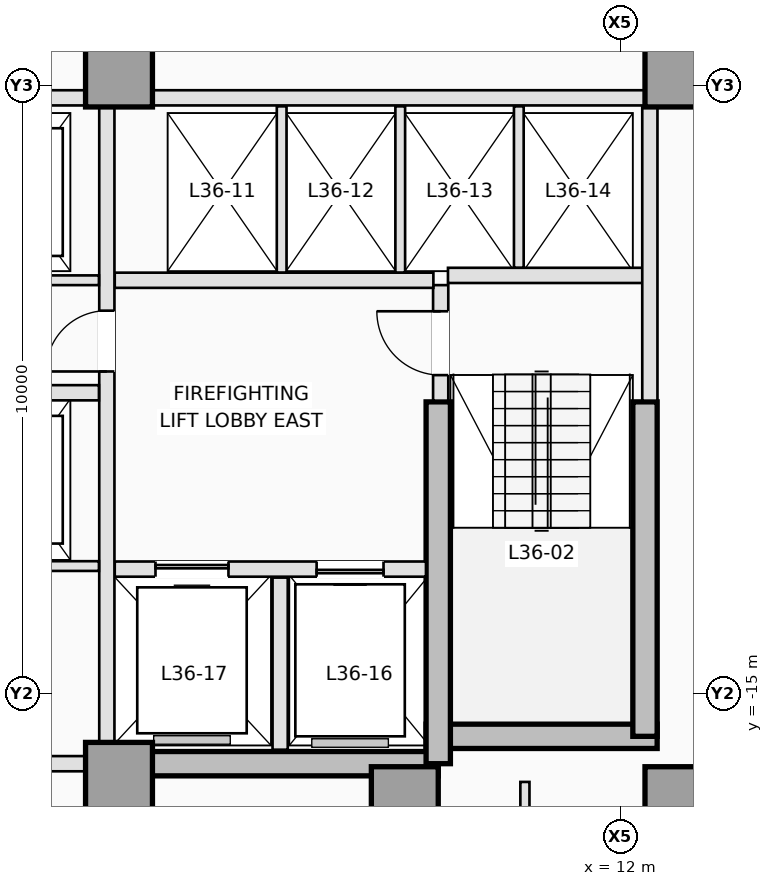
"""IFC4 building model, lengths in metres.
Left out: names, types, materials, properties, quantities, classifications, styles, units other than length and angle.
Written with IfcOpenShell. Run it as: python <this file> out.ifc"""

import sys

from ifc_helpers import new_model, si_unit, direction, frame, frame_2d, origin, origin_2d, place, context, subcontext, project, spatial, rectangle, extrude, element, fill, save


model = new_model("IFC4")
c1 = context("Model", 3, precision=1e-05, world=origin(), true_north=direction((0.0, 1.0)))
c2 = subcontext(c1, "Body", "Model", "MODEL_VIEW")
j1 = project(units=[si_unit("LENGTHUNIT", "METRE"), si_unit("PLANEANGLEUNIT", "RADIAN")], contexts=[c1])
p1 = place(None, origin())
s1 = spatial("IfcSite", under=j1, at=p1, CompositionType="ELEMENT")
p2 = place(p1, origin())
s2 = spatial("IfcBuilding", under=s1, at=p2, CompositionType="ELEMENT")
p3 = place(p2, frame((0.0, 0.0, 133.5)))
s3 = spatial("IfcBuildingStorey", under=s2, at=p3, CompositionType="ELEMENT", Elevation=133.5)
p4 = place(p3, frame((3.75, -16.15, 0.0), z_axis=(0.0, 0.0, 1.0), x_axis=(1.0, 0.0, 0.0)))
e1 = element("IfcWall", 1, at=p4, inside=s3, PredefinedType="SHEAR", context=c2, shape_type="SweptSolid", body=[
    extrude(rectangle(XDim=5.25, YDim=0.4, at=frame_2d((2.625, 0.0))), origin(), (0.0, 0.0, 1.0), 3.5),
])
p5 = place(p3, frame((8.8, -15.7, 0.0), z_axis=(0.0, 0.0, 1.0), x_axis=(1.0, 0.0, 0.0)))
e2 = element("IfcWall", 2, at=p5, inside=s3, PredefinedType="SHEAR", context=c2, shape_type="SweptSolid", body=[
    extrude(rectangle(XDim=3.8, YDim=0.4, at=frame_2d((1.9, 0.0))), origin(), (0.0, 0.0, 1.0), 3.5),
])
p6 = place(p3, frame((12.4, -15.7, 0.0), z_axis=(0.0, 0.0, 1.0), x_axis=(0.0, 1.0, 0.0)))
e3 = element("IfcWall", 3, at=p6, inside=s3, PredefinedType="SHEAR", context=c2, shape_type="SweptSolid", body=[
    extrude(rectangle(XDim=5.5, YDim=0.4, at=frame_2d((2.75, 0.0))), origin(), (0.0, 0.0, 1.0), 3.5),
])
p7 = place(p3, frame((9.0, -16.15, 0.0), z_axis=(0.0, 0.0, 1.0), x_axis=(0.0, 1.0, 0.0)))
e4 = element("IfcWall", 4, at=p7, inside=s3, PredefinedType="SHEAR", context=c2, shape_type="SweptSolid", body=[
    extrude(rectangle(XDim=5.95, YDim=0.4, at=frame_2d((2.975, 0.0))), origin(), (0.0, 0.0, 1.0), 3.5),
])
for number, where, z_axis, x_axis in (
    (5, (3.75, -16.35, 0.0), (0.0, 0.0, 1.0), (1.0, 0.0, 0.0)),
    (6, (8.45, -16.75, 0.0), (0.0, 0.0, 1.0), (1.0, 0.0, 0.0)),
    (7, (12.95, -16.75, 0.0), (0.0, 0.0, 1.0), (1.0, 0.0, 0.0)),
    (8, (3.75, -4.8, 0.0), (0.0, 0.0, 1.0), (1.0, 0.0, 0.0)),
    (9, (12.95, -4.8, 0.0), (0.0, 0.0, 1.0), (1.0, 0.0, 0.0)),
):
    element("IfcColumn", number, at=place(p3, frame(where, z_axis=z_axis, x_axis=x_axis)), inside=s3, PredefinedType="COLUMN", context=c2, shape_type="SweptSolid", body=[
        extrude(rectangle(XDim=1.1, YDim=1.1, at=origin_2d()), origin(), (0.0, 0.0, 1.0), 3.5),
    ])
p8 = place(p3, frame((9.04, -10.18, 0.0), z_axis=(0.0, 0.0, 1.0), x_axis=(0.0, 1.0, 0.0)))
e10 = element("IfcWall", 10, at=p8, inside=s3, PredefinedType="PARTITIONING", context=c2, shape_type="SweptSolid", body=[
    extrude(rectangle(XDim=1.9, YDim=0.25, at=frame_2d((0.95, 0.0))), origin(), (0.0, 0.0, 1.0), 3.25),
])
p9 = place(p8, frame((0.42, 0.0, 0.0)))
e11 = element("IfcOpeningElement", 11, at=p9, cuts=e10, PredefinedType="OPENING", context=c2, shape_type="SweptSolid", body=[
    extrude(rectangle(XDim=1.05, YDim=2.15, at=frame_2d((0.525, 1.075))), frame((0.0, 0.135, 0.0), z_axis=(0.0, -1.0, 0.0), x_axis=(1.0, 0.0, 0.0)), (0.0, 0.0, 1.0), 0.27),
])
p10 = place(p3, frame((9.16, -8.12, 0.0), z_axis=(0.0, 0.0, 1.0), x_axis=(1.0, 0.0, 0.0)))
e12 = element("IfcWall", 12, at=p10, inside=s3, PredefinedType="PARTITIONING", context=c2, shape_type="SweptSolid", body=[
    extrude(rectangle(XDim=3.22, YDim=0.25, at=frame_2d((1.61, 0.0))), origin(), (0.0, 0.0, 1.0), 3.25),
])
p11 = place(p3, frame((12.48, -10.18, 0.0), z_axis=(0.0, 0.0, 1.0), x_axis=(0.0, 1.0, 0.0)))
e13 = element("IfcWall", 13, at=p11, inside=s3, PredefinedType="PARTITIONING", context=c2, shape_type="SweptSolid", body=[
    extrude(rectangle(XDim=4.828, YDim=0.25, at=frame_2d((2.414, 0.0))), origin(), (0.0, 0.0, 1.0), 3.25),
])
p12 = place(p3, frame((3.68, -12.95, 0.0), z_axis=(0.0, 0.0, 1.0), x_axis=(1.0, 0.0, 0.0)))
e14 = element("IfcWall", 14, at=p12, inside=s3, PredefinedType="PARTITIONING", context=c2, shape_type="SweptSolid", body=[
    extrude(rectangle(XDim=5.118, YDim=0.25, at=frame_2d((2.559, 0.0))), origin(), (0.0, 0.0, 1.0), 3.25),
])
p13 = place(p12, frame((3.32, 0.0, 0.0)))
e15 = element("IfcOpeningElement", 15, at=p13, cuts=e14, PredefinedType="OPENING", context=c2, shape_type="SweptSolid", body=[
    extrude(rectangle(XDim=1.1, YDim=2.15, at=frame_2d((0.55, 1.075))), frame((0.0, 0.135, 0.0), z_axis=(0.0, -1.0, 0.0), x_axis=(1.0, 0.0, 0.0)), (0.0, 0.0, 1.0), 0.27),
])
p14 = place(p12, frame((0.67, 0.0, 0.0)))
e16 = element("IfcOpeningElement", 16, at=p14, cuts=e14, PredefinedType="OPENING", context=c2, shape_type="SweptSolid", body=[
    extrude(rectangle(XDim=1.2, YDim=2.15, at=frame_2d((0.6, 1.075))), frame((0.0, 0.135, 0.0), z_axis=(0.0, -1.0, 0.0), x_axis=(1.0, 0.0, 0.0)), (0.0, 0.0, 1.0), 0.27),
])
p15 = place(p3, frame((6.4, -15.92, 0.0), z_axis=(0.0, 0.0, 1.0), x_axis=(0.0, 1.0, 0.0)))
e17 = element("IfcWall", 17, at=p15, inside=s3, PredefinedType="PARTITIONING", context=c2, shape_type="SweptSolid", body=[
    extrude(rectangle(XDim=2.83, YDim=0.25, at=frame_2d((1.415, 0.0))), origin(), (0.0, 0.0, 1.0), 3.25),
])
p16 = place(p3, frame((3.68, -8.2, 0.0), z_axis=(0.0, 0.0, 1.0), x_axis=(1.0, 0.0, 0.0)))
e18 = element("IfcWall", 18, at=p16, inside=s3, PredefinedType="PARTITIONING", context=c2, shape_type="SweptSolid", body=[
    extrude(rectangle(XDim=5.24, YDim=0.25, at=frame_2d((2.62, 0.0))), origin(), (0.0, 0.0, 1.0), 3.25),
])
p17 = place(p3, frame((3.55, -15.798, 0.0), z_axis=(0.0, 0.0, 1.0), x_axis=(0.0, 1.0, 0.0)))
e19 = element("IfcWall", 19, at=p17, inside=s3, PredefinedType="PARTITIONING", context=c2, shape_type="SweptSolid", body=[
    extrude(rectangle(XDim=10.446, YDim=0.25, at=frame_2d((5.223, 0.0))), origin(), (0.0, 0.0, 1.0), 3.25),
])
p18 = place(p17, frame((6.098, 0.0, 0.0)))
e20 = element("IfcOpeningElement", 20, at=p18, cuts=e19, PredefinedType="OPENING", context=c2, shape_type="SweptSolid", body=[
    extrude(rectangle(XDim=1.0, YDim=2.15, at=frame_2d((0.5, 1.075))), frame((0.0, 0.135, 0.0), z_axis=(0.0, -1.0, 0.0), x_axis=(1.0, 0.0, 0.0)), (0.0, 0.0, 1.0), 0.27),
])
p19 = place(p3, frame((4.302, -5.2, 0.0), z_axis=(0.0, 0.0, 1.0), x_axis=(1.0, 0.0, 0.0)))
e21 = element("IfcWall", 21, at=p19, inside=s3, PredefinedType="PARTITIONING", context=c2, shape_type="SweptSolid", body=[
    extrude(rectangle(XDim=8.096, YDim=0.25, at=frame_2d((4.048, 0.0))), origin(), (0.0, 0.0, 1.0), 3.25),
])
p20 = place(p3, frame((0.95, -5.2, 0.0), z_axis=(0.0, 0.0, 1.0), x_axis=(1.0, 0.0, 0.0)))
e22 = element("IfcWall", 22, at=p20, inside=s3, PredefinedType="PARTITIONING", context=c2, shape_type="SweptSolid", body=[
    extrude(rectangle(XDim=2.248, YDim=0.25, at=frame_2d((1.124, 0.0))), origin(), (0.0, 0.0, 1.0), 3.25),
])
p21 = place(p20, frame((0.55, 0.0, 0.0)))
e23 = element("IfcOpeningElement", 23, at=p21, cuts=e22, PredefinedType="OPENING", context=c2, shape_type="SweptSolid", body=[
    extrude(rectangle(XDim=1.0, YDim=2.15, at=frame_2d((0.5, 1.075))), frame((0.0, 0.135, 0.0), z_axis=(0.0, -1.0, 0.0), x_axis=(1.0, 0.0, 0.0)), (0.0, 0.0, 1.0), 0.27),
])
for number, where, z_axis, x_axis in (
    (24, (6.425, -8.073, 0.0), (0.0, 0.0, 1.0), (0.0, 1.0, 0.0)),
    (25, (8.375, -8.073, 0.0), (0.0, 0.0, 1.0), (0.0, 1.0, 0.0)),
):
    element("IfcWall", number, at=place(p3, frame(where, z_axis=z_axis, x_axis=x_axis)), inside=s3, PredefinedType="PARTITIONING", context=c2, shape_type="SweptSolid", body=[
        extrude(rectangle(XDim=2.733, YDim=0.16, at=frame_2d((1.366, 0.0))), origin(), (0.0, 0.0, 1.0), 3.25),
    ])
p22 = place(p3, frame((10.325, -7.993, 0.0), z_axis=(0.0, 0.0, 1.0), x_axis=(0.0, 1.0, 0.0)))
e26 = element("IfcWall", 26, at=p22, inside=s3, PredefinedType="PARTITIONING", context=c2, shape_type="SweptSolid", body=[
    extrude(rectangle(XDim=2.653, YDim=0.16, at=frame_2d((1.326, 0.0))), origin(), (0.0, 0.0, 1.0), 3.25),
])
p23 = place(p3, frame((-3.198, -16.15, 0.0), z_axis=(0.0, 0.0, 1.0), x_axis=(1.0, 0.0, 0.0)))
e27 = element("IfcWall", 27, at=p23, inside=s3, PredefinedType="PARTITIONING", context=c2, shape_type="SweptSolid", body=[
    extrude(rectangle(XDim=6.396, YDim=0.25, at=frame_2d((3.198, 0.0))), origin(), (0.0, 0.0, 1.0), 2.45),
])
p24 = place(p3, frame((0.95, -8.2, 0.0), z_axis=(0.0, 0.0, 1.0), x_axis=(1.0, 0.0, 0.0)))
e28 = element("IfcWall", 28, at=p24, inside=s3, PredefinedType="PARTITIONING", context=c2, shape_type="SweptSolid", body=[
    extrude(rectangle(XDim=2.47, YDim=0.16, at=frame_2d((1.235, 0.0))), origin(), (0.0, 0.0, 1.0), 3.25),
])
p25 = place(p3, frame((0.95, -10.05, 0.0), z_axis=(0.0, 0.0, 1.0), x_axis=(1.0, 0.0, 0.0)))
e29 = element("IfcWall", 29, at=p25, inside=s3, PredefinedType="PARTITIONING", context=c2, shape_type="SweptSolid", body=[
    extrude(rectangle(XDim=2.47, YDim=0.25, at=frame_2d((1.235, 0.0))), origin(), (0.0, 0.0, 1.0), 3.25),
])
p26 = place(p25, frame((0.55, 0.0, 0.0)))
e30 = element("IfcOpeningElement", 30, at=p26, cuts=e29, PredefinedType="OPENING", context=c2, shape_type="SweptSolid", body=[
    extrude(rectangle(XDim=1.0, YDim=2.15, at=frame_2d((0.5, 1.075))), frame((0.0, 0.135, 0.0), z_axis=(0.0, -1.0, 0.0), x_axis=(1.0, 0.0, 0.0)), (0.0, 0.0, 1.0), 0.27),
])
p27 = place(p3, frame((-3.42, -12.9, 0.0), z_axis=(0.0, 0.0, 1.0), x_axis=(1.0, 0.0, 0.0)))
e31 = element("IfcWall", 31, at=p27, inside=s3, PredefinedType="PARTITIONING", context=c2, shape_type="SweptSolid", body=[
    extrude(rectangle(XDim=6.84, YDim=0.16, at=frame_2d((3.42, 0.0))), origin(), (0.0, 0.0, 1.0), 3.25),
])
p28 = place(p27, frame((2.98, 0.0, 0.0)))
e32 = element("IfcOpeningElement", 32, at=p28, cuts=e31, PredefinedType="OPENING", context=c2, shape_type="SweptSolid", body=[
    extrude(rectangle(XDim=0.88, YDim=2.12, at=frame_2d((0.44, 1.06))), frame((0.0, 0.09, 0.0), z_axis=(0.0, -1.0, 0.0), x_axis=(1.0, 0.0, 0.0)), (0.0, 0.0, 1.0), 0.18),
])
p29 = place(p3, frame((10.425, -18.83, 0.0), z_axis=(0.0, 0.0, 1.0), x_axis=(0.0, 1.0, 0.0)))
e33 = element("IfcWall", 33, at=p29, inside=s3, PredefinedType="PARTITIONING", context=c2, shape_type="SweptSolid", body=[
    extrude(rectangle(XDim=2.38, YDim=0.15, at=frame_2d((1.19, 0.0))), origin(), (0.0, 0.0, 1.0), 3.25),
])
p30 = place(p13, origin())
e34 = element("IfcDoor", 34, at=p30, inside=s3, OperationType="SLIDING_TO_RIGHT", PredefinedType="DOOR", context=c2, shape_type="SweptSolid", body=[
    extrude(rectangle(XDim=1.1, YDim=2.15, at=frame_2d((0.55, 1.075))), frame((0.0, 0.025, 0.0), z_axis=(0.0, -1.0, 0.0), x_axis=(1.0, 0.0, 0.0)), (0.0, 0.0, 1.0), 0.05),
])
fill(e15, e34)
p31 = place(p14, origin())
e35 = element("IfcDoor", 35, at=p31, inside=s3, OperationType="SLIDING_TO_LEFT", PredefinedType="DOOR", context=c2, shape_type="SweptSolid", body=[
    extrude(rectangle(XDim=1.2, YDim=2.15, at=frame_2d((0.6, 1.075))), frame((0.0, 0.025, 0.0), z_axis=(0.0, -1.0, 0.0), x_axis=(1.0, 0.0, 0.0)), (0.0, 0.0, 1.0), 0.05),
])
fill(e16, e35)
p32 = place(p9, origin())
e36 = element("IfcDoor", 36, at=p32, inside=s3, OperationType="SINGLE_SWING_RIGHT", PredefinedType="DOOR", context=c2, shape_type="SweptSolid", body=[
    extrude(rectangle(XDim=1.05, YDim=2.15, at=frame_2d((0.525, 1.075))), frame((0.0, 0.025, 0.0), z_axis=(0.0, -1.0, 0.0), x_axis=(1.0, 0.0, 0.0)), (0.0, 0.0, 1.0), 0.05),
])
fill(e11, e36)
p33 = place(p18, origin())
e37 = element("IfcDoor", 37, at=p33, inside=s3, OperationType="SINGLE_SWING_LEFT", PredefinedType="DOOR", context=c2, shape_type="SweptSolid", body=[
    extrude(rectangle(XDim=1.0, YDim=2.15, at=frame_2d((0.5, 1.075))), frame((0.0, 0.025, 0.0), z_axis=(0.0, -1.0, 0.0), x_axis=(1.0, 0.0, 0.0)), (0.0, 0.0, 1.0), 0.05),
])
fill(e20, e37)
save(model, sys.argv[1])
